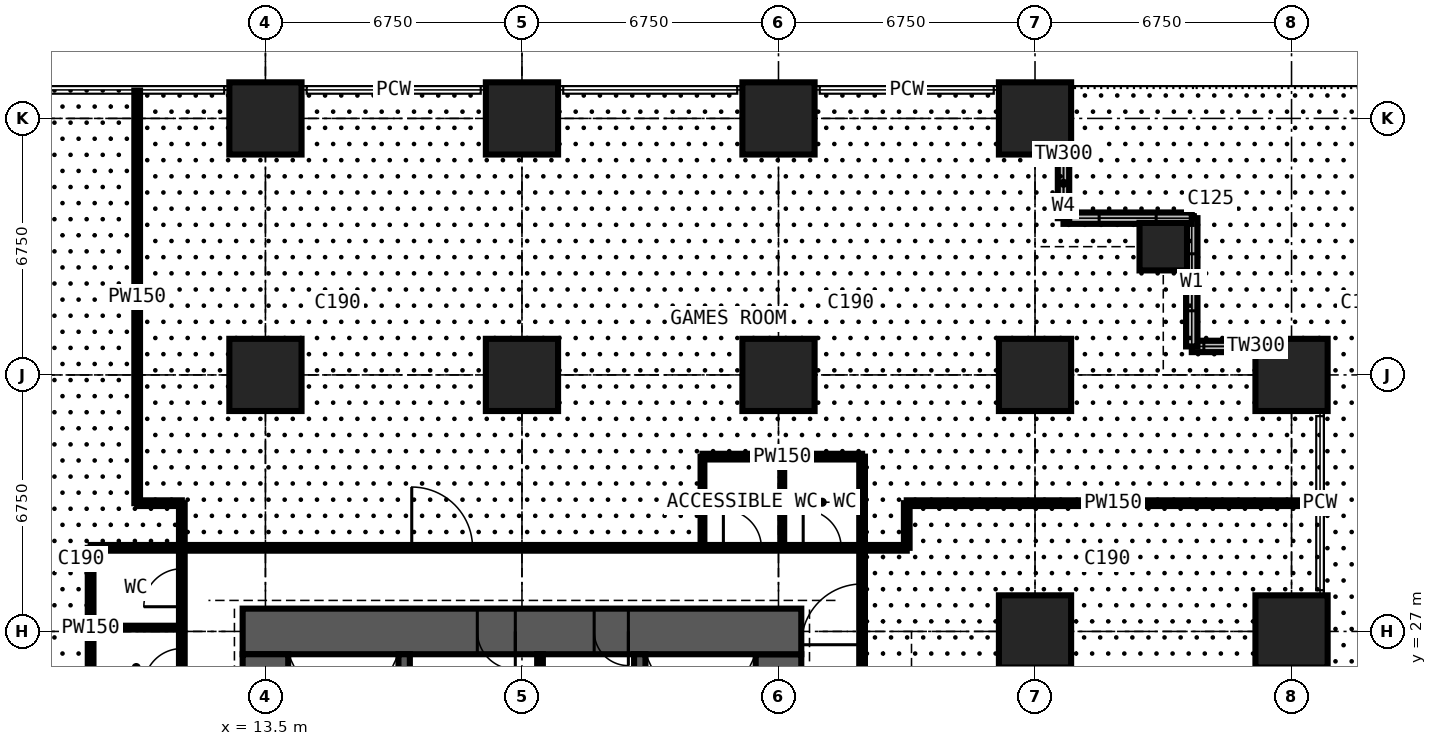
"""IFC4 building model, lengths in metres.
Left out: names, types, materials, properties, quantities, classifications, styles, units other than length and angle.
Written with IfcOpenShell. Run it as: python <this file> out.ifc"""

import sys

from ifc_helpers import new_model, si_unit, direction, frame, frame_2d, origin, origin_2d, place, context, subcontext, project, spatial, rectangle, extrude, element, fill, save


model = new_model("IFC4")
c1 = context("Model", 3, precision=1e-05, world=origin(), true_north=direction((0.0, 1.0)))
c2 = subcontext(c1, "Body", "Model", "MODEL_VIEW")
j1 = project(units=[si_unit("LENGTHUNIT", "METRE"), si_unit("PLANEANGLEUNIT", "RADIAN")], contexts=[c1])
p1 = place(None, origin())
s1 = spatial("IfcSite", under=j1, at=p1, CompositionType="ELEMENT")
p2 = place(p1, origin())
s2 = spatial("IfcBuilding", under=s1, at=p2, CompositionType="ELEMENT")
p3 = place(p2, frame((0.0, 0.0, 13.5)))
s3 = spatial("IfcBuildingStorey", under=s2, at=p3, CompositionType="ELEMENT", Elevation=13.5)
for number, where, z_axis, x_axis in (
    (1, (13.5, 33.75, 0.0), (0.0, 0.0, 1.0), (1.0, 0.0, 0.0)),
    (2, (13.5, 40.5, 0.0), (0.0, 0.0, 1.0), (1.0, 0.0, 0.0)),
    (3, (20.25, 33.75, 0.0), (0.0, 0.0, 1.0), (1.0, 0.0, 0.0)),
    (4, (20.25, 40.5, 0.0), (0.0, 0.0, 1.0), (1.0, 0.0, 0.0)),
    (5, (27.0, 33.75, 0.0), (0.0, 0.0, 1.0), (1.0, 0.0, 0.0)),
    (6, (27.0, 40.5, 0.0), (0.0, 0.0, 1.0), (1.0, 0.0, 0.0)),
    (7, (33.75, 27.0, 0.0), (0.0, 0.0, 1.0), (1.0, 0.0, 0.0)),
    (8, (33.75, 33.75, 0.0), (0.0, 0.0, 1.0), (1.0, 0.0, 0.0)),
    (9, (33.75, 40.5, 0.0), (0.0, 0.0, 1.0), (1.0, 0.0, 0.0)),
):
    element("IfcColumn", number, at=place(p3, frame(where, z_axis=z_axis, x_axis=x_axis)), inside=s3, PredefinedType="COLUMN", context=c2, shape_type="SweptSolid", body=[
        extrude(rectangle(XDim=1.9, YDim=1.9, at=origin_2d()), origin(), (0.0, 0.0, 1.0), 4.5),
    ])
p4 = place(p3, frame((37.125, 37.125, 0.0), z_axis=(0.0, 0.0, 1.0), x_axis=(1.0, 0.0, 0.0)))
e10 = element("IfcColumn", 10, at=p4, inside=s3, PredefinedType="COLUMN", context=c2, shape_type="SweptSolid", body=[
    extrude(rectangle(XDim=1.25, YDim=1.25, at=origin_2d()), origin(), (0.0, 0.0, 1.0), 4.5),
])
for number, where, z_axis, x_axis in (
    (11, (40.5, 27.0, 0.0), (0.0, 0.0, 1.0), (1.0, 0.0, 0.0)),
    (12, (40.5, 33.75, 0.0), (0.0, 0.0, 1.0), (1.0, 0.0, 0.0)),
):
    element("IfcColumn", number, at=place(p3, frame(where, z_axis=z_axis, x_axis=x_axis)), inside=s3, PredefinedType="COLUMN", context=c2, shape_type="SweptSolid", body=[
        extrude(rectangle(XDim=1.9, YDim=1.9, at=origin_2d()), origin(), (0.0, 0.0, 1.0), 4.5),
    ])
p5 = place(p3, frame((27.0, 14.1, 0.0), z_axis=(0.0, 0.0, 1.0), x_axis=(0.0, 1.0, 0.0)))
e13 = element("IfcWall", 13, at=p5, inside=s3, PredefinedType="SHEAR", context=c2, shape_type="SweptSolid", body=[
    extrude(rectangle(XDim=12.3, YDim=1.2, at=frame_2d((6.15, 0.0))), origin(), (0.0, 0.0, 1.0), 4.5),
])
p6 = place(p5, frame((3.65, 0.0, 0.0)))
e14 = element("IfcOpeningElement", 14, at=p6, cuts=e13, PredefinedType="OPENING", context=c2, shape_type="SweptSolid", body=[
    extrude(rectangle(XDim=1.2, YDim=2.2, at=frame_2d((0.6, 1.1))), frame((0.0, 0.61, 0.0), z_axis=(0.0, -1.0, 0.0), x_axis=(1.0, 0.0, 0.0)), (0.0, 0.0, 1.0), 1.22),
])
p7 = place(p3, frame((27.6, 27.0, 0.0), z_axis=(0.0, 0.0, 1.0), x_axis=(-1.0, 0.0, 0.0)))
e15 = element("IfcWall", 15, at=p7, inside=s3, PredefinedType="SHEAR", context=c2, shape_type="SweptSolid", body=[
    extrude(rectangle(XDim=14.7, YDim=1.2, at=frame_2d((7.35, 0.0))), origin(), (0.0, 0.0, 1.0), 4.5),
])
p8 = place(p7, frame((4.55, 0.0, 0.0)))
e16 = element("IfcOpeningElement", 16, at=p8, cuts=e15, PredefinedType="OPENING", context=c2, shape_type="SweptSolid", body=[
    extrude(rectangle(XDim=0.9, YDim=2.2, at=frame_2d((0.45, 1.1))), frame((0.0, 0.61, 0.0), z_axis=(0.0, -1.0, 0.0), x_axis=(1.0, 0.0, 0.0)), (0.0, 0.0, 1.0), 1.22),
])
p9 = place(p7, frame((7.525, 0.0, 0.0)))
e17 = element("IfcOpeningElement", 17, at=p9, cuts=e15, PredefinedType="OPENING", context=c2, shape_type="SweptSolid", body=[
    extrude(rectangle(XDim=1.0, YDim=2.2, at=frame_2d((0.5, 1.1))), frame((0.0, 0.61, 0.0), z_axis=(0.0, -1.0, 0.0), x_axis=(1.0, 0.0, 0.0)), (0.0, 0.0, 1.0), 1.22),
])
p10 = place(p3, frame((13.5, 26.4, 0.0), z_axis=(0.0, 0.0, 1.0), x_axis=(0.0, -1.0, 0.0)))
e18 = element("IfcWall", 18, at=p10, inside=s3, PredefinedType="SHEAR", context=c2, shape_type="SweptSolid", body=[
    extrude(rectangle(XDim=12.3, YDim=1.2, at=frame_2d((6.15, 0.0))), origin(), (0.0, 0.0, 1.0), 4.5),
])
p11 = place(p10, frame((7.45, 0.0, 0.0)))
e19 = element("IfcOpeningElement", 19, at=p11, cuts=e18, PredefinedType="OPENING", context=c2, shape_type="SweptSolid", body=[
    extrude(rectangle(XDim=1.2, YDim=2.2, at=frame_2d((0.6, 1.1))), frame((0.0, 0.61, 0.0), z_axis=(0.0, -1.0, 0.0), x_axis=(1.0, 0.0, 0.0)), (0.0, 0.0, 1.0), 1.22),
])
p12 = place(p3, frame((41.25, 27.0, 0.0), z_axis=(0.0, 0.0, 1.0), x_axis=(0.0, -1.0, 0.0)))
e20 = element("IfcWall", 20, at=p12, inside=s3, PredefinedType="SOLIDWALL", context=c2, shape_type="SweptSolid", body=[
    extrude(rectangle(XDim=6.75, YDim=0.15, at=frame_2d((3.375, 0.0))), origin(), (0.0, 0.0, 1.0), 4.275),
])
p13 = place(p12, frame((0.962, 0.0, 0.0)))
e21 = element("IfcOpeningElement", 21, at=p13, cuts=e20, PredefinedType="OPENING", context=c2, shape_type="SweptSolid", body=[
    extrude(rectangle(XDim=2.4, YDim=2.4, at=frame_2d((1.2, 1.2))), frame((0.0, 0.085, 0.0), z_axis=(0.0, -1.0, 0.0), x_axis=(1.0, 0.0, 0.0)), (0.0, 0.0, 1.0), 0.17),
])
p14 = place(p12, frame((3.387, 0.0, 0.0)))
e22 = element("IfcOpeningElement", 22, at=p14, cuts=e20, PredefinedType="OPENING", context=c2, shape_type="SweptSolid", body=[
    extrude(rectangle(XDim=2.4, YDim=2.4, at=frame_2d((1.2, 1.2))), frame((0.0, 0.085, 0.0), z_axis=(0.0, -1.0, 0.0), x_axis=(1.0, 0.0, 0.0)), (0.0, 0.0, 1.0), 0.17),
])
p15 = place(p3, frame((41.25, 34.5, 0.0), z_axis=(0.0, 0.0, 1.0), x_axis=(-1.0, 0.0, 0.0)))
e23 = element("IfcWall", 23, at=p15, inside=s3, PredefinedType="SOLIDWALL", context=c2, shape_type="SweptSolid", body=[
    extrude(rectangle(XDim=3.375, YDim=0.3, at=frame_2d((1.688, 0.0))), origin(), (0.0, 0.0, 1.0), 4.275),
])
p16 = place(p15, frame((1.857, 0.0, 0.9)))
e24 = element("IfcOpeningElement", 24, at=p16, cuts=e23, PredefinedType="OPENING", context=c2, shape_type="SweptSolid", body=[
    extrude(rectangle(XDim=1.2, YDim=1.8, at=frame_2d((0.6, 0.9))), frame((0.0, 0.16, 0.0), z_axis=(0.0, -1.0, 0.0), x_axis=(1.0, 0.0, 0.0)), (0.0, 0.0, 1.0), 0.32),
])
p17 = place(p3, frame((37.875, 34.5, 0.0), z_axis=(0.0, 0.0, 1.0), x_axis=(0.0, 1.0, 0.0)))
e25 = element("IfcWall", 25, at=p17, inside=s3, PredefinedType="SOLIDWALL", context=c2, shape_type="SweptSolid", body=[
    extrude(rectangle(XDim=3.375, YDim=0.3, at=frame_2d((1.688, 0.0))), origin(), (0.0, 0.0, 1.0), 4.275),
])
p18 = place(p17, frame((0.938, 0.0, 0.9)))
e26 = element("IfcOpeningElement", 26, at=p18, cuts=e25, PredefinedType="OPENING", context=c2, shape_type="SweptSolid", body=[
    extrude(rectangle(XDim=1.5, YDim=1.8, at=frame_2d((0.75, 0.9))), frame((0.0, 0.16, 0.0), z_axis=(0.0, -1.0, 0.0), x_axis=(1.0, 0.0, 0.0)), (0.0, 0.0, 1.0), 0.32),
])
p19 = place(p3, frame((37.875, 37.875, 0.0), z_axis=(0.0, 0.0, 1.0), x_axis=(-1.0, 0.0, 0.0)))
e27 = element("IfcWall", 27, at=p19, inside=s3, PredefinedType="SOLIDWALL", context=c2, shape_type="SweptSolid", body=[
    extrude(rectangle(XDim=3.375, YDim=0.3, at=frame_2d((1.688, 0.0))), origin(), (0.0, 0.0, 1.0), 4.275),
])
p20 = place(p19, frame((0.938, 0.0, 0.9)))
e28 = element("IfcOpeningElement", 28, at=p20, cuts=e27, PredefinedType="OPENING", context=c2, shape_type="SweptSolid", body=[
    extrude(rectangle(XDim=1.5, YDim=1.8, at=frame_2d((0.75, 0.9))), frame((0.0, 0.16, 0.0), z_axis=(0.0, -1.0, 0.0), x_axis=(1.0, 0.0, 0.0)), (0.0, 0.0, 1.0), 0.32),
])
p21 = place(p3, frame((34.5, 37.875, 0.0), z_axis=(0.0, 0.0, 1.0), x_axis=(0.0, 1.0, 0.0)))
e29 = element("IfcWall", 29, at=p21, inside=s3, PredefinedType="SOLIDWALL", context=c2, shape_type="SweptSolid", body=[
    extrude(rectangle(XDim=3.375, YDim=0.3, at=frame_2d((1.688, 0.0))), origin(), (0.0, 0.0, 1.0), 4.275),
])
p22 = place(p21, frame((0.317, 0.0, 0.9)))
e30 = element("IfcOpeningElement", 30, at=p22, cuts=e29, PredefinedType="OPENING", context=c2, shape_type="SweptSolid", body=[
    extrude(rectangle(XDim=1.2, YDim=1.8, at=frame_2d((0.6, 0.9))), frame((0.0, 0.16, 0.0), z_axis=(0.0, -1.0, 0.0), x_axis=(1.0, 0.0, 0.0)), (0.0, 0.0, 1.0), 0.32),
])
for number, where, z_axis, x_axis in (
    (31, (17.15, 20.3, 0.0), (0.0, 0.0, 1.0), (0.0, 1.0, 0.0)),
    (32, (23.35, 20.3, 0.0), (0.0, 0.0, 1.0), (0.0, 1.0, 0.0)),
):
    element("IfcWall", number, at=place(p3, frame(where, z_axis=z_axis, x_axis=x_axis)), inside=s3, PredefinedType="SHEAR", context=c2, shape_type="SweptSolid", body=[
        extrude(rectangle(XDim=6.1, YDim=0.3, at=frame_2d((3.05, 0.0))), origin(), (0.0, 0.0, 1.0), 4.5),
    ])
p23 = place(p3, frame((20.725, 23.4, 0.0), z_axis=(0.0, 0.0, 1.0), x_axis=(0.0, 1.0, 0.0)))
e33 = element("IfcWall", 33, at=p23, inside=s3, PredefinedType="PARTITIONING", context=c2, shape_type="SweptSolid", body=[
    extrude(rectangle(XDim=3.0, YDim=0.15, at=frame_2d((1.5, 0.0))), origin(), (0.0, 0.0, 1.0), 4.275),
])
p24 = place(p3, frame((8.9, 25.0, 0.0), z_axis=(0.0, 0.0, 1.0), x_axis=(0.0, 1.0, 0.0)))
e34 = element("IfcWall", 34, at=p24, inside=s3, PredefinedType="PARTITIONING", context=c2, shape_type="SweptSolid", body=[
    extrude(rectangle(XDim=4.2, YDim=0.15, at=frame_2d((2.1, 0.0))), origin(), (0.0, 0.0, 1.0), 4.275),
])
p25 = place(p3, frame((8.9, 27.1, 0.0), z_axis=(0.0, 0.0, 1.0), x_axis=(1.0, 0.0, 0.0)))
e35 = element("IfcWall", 35, at=p25, inside=s3, PredefinedType="PARTITIONING", context=c2, shape_type="SweptSolid", body=[
    extrude(rectangle(XDim=2.4, YDim=0.1, at=frame_2d((1.2, 0.0))), origin(), (0.0, 0.0, 1.0), 3.777),
])
p26 = place(p3, frame((8.9, 29.2, 0.0), z_axis=(0.0, 0.0, 1.0), x_axis=(1.0, 0.0, 0.0)))
e36 = element("IfcWall", 36, at=p26, inside=s3, PredefinedType="PARTITIONING", context=c2, shape_type="SweptSolid", body=[
    extrude(rectangle(XDim=21.475, YDim=0.15, at=frame_2d((10.738, 0.0))), origin(), (0.0, 0.0, 1.0), 4.275),
])
p27 = place(p26, frame((16.65, 0.0, 0.0)))
e37 = element("IfcOpeningElement", 37, at=p27, cuts=e36, PredefinedType="OPENING", context=c2, shape_type="SweptSolid", body=[
    extrude(rectangle(XDim=1.0, YDim=2.2, at=frame_2d((0.5, 1.1))), frame((0.0, 0.085, 0.0), z_axis=(0.0, -1.0, 0.0), x_axis=(1.0, 0.0, 0.0)), (0.0, 0.0, 1.0), 0.17),
])
p28 = place(p26, frame((18.75, 0.0, 0.0)))
e38 = element("IfcOpeningElement", 38, at=p28, cuts=e36, PredefinedType="OPENING", context=c2, shape_type="SweptSolid", body=[
    extrude(rectangle(XDim=1.0, YDim=2.2, at=frame_2d((0.5, 1.1))), frame((0.0, 0.085, 0.0), z_axis=(0.0, -1.0, 0.0), x_axis=(1.0, 0.0, 0.0)), (0.0, 0.0, 1.0), 0.17),
])
p29 = place(p26, frame((8.45, 0.0, 0.0)))
e39 = element("IfcOpeningElement", 39, at=p29, cuts=e36, PredefinedType="OPENING", context=c2, shape_type="SweptSolid", body=[
    extrude(rectangle(XDim=1.6, YDim=2.4, at=frame_2d((0.8, 1.2))), frame((0.0, 0.085, 0.0), z_axis=(0.0, -1.0, 0.0), x_axis=(1.0, 0.0, 0.0)), (0.0, 0.0, 1.0), 0.17),
])
p30 = place(p3, frame((10.125, 30.375, 0.0), z_axis=(0.0, 0.0, 1.0), x_axis=(0.0, 1.0, 0.0)))
e40 = element("IfcWall", 40, at=p30, inside=s3, PredefinedType="PARTITIONING", context=c2, shape_type="SweptSolid", body=[
    extrude(rectangle(XDim=10.859, YDim=0.15, at=frame_2d((5.429, 0.0))), origin(), (0.0, 0.0, 1.0), 4.275),
])
p31 = place(p3, frame((10.125, 30.375, 0.0), z_axis=(0.0, 0.0, 1.0), x_axis=(1.0, 0.0, 0.0)))
e41 = element("IfcWall", 41, at=p31, inside=s3, PredefinedType="PARTITIONING", context=c2, shape_type="SweptSolid", body=[
    extrude(rectangle(XDim=1.175, YDim=0.15, at=frame_2d((0.587, 0.0))), origin(), (0.0, 0.0, 1.0), 4.275),
])
p32 = place(p3, frame((11.3, 8.9, 0.0), z_axis=(0.0, 0.0, 1.0), x_axis=(0.0, 1.0, 0.0)))
e42 = element("IfcWall", 42, at=p32, inside=s3, PredefinedType="PARTITIONING", context=c2, shape_type="SweptSolid", body=[
    extrude(rectangle(XDim=21.475, YDim=0.15, at=frame_2d((10.738, 0.0))), origin(), (0.0, 0.0, 1.0), 4.275),
])
p33 = place(p32, frame((16.65, 0.0, 0.0)))
e43 = element("IfcOpeningElement", 43, at=p33, cuts=e42, PredefinedType="OPENING", context=c2, shape_type="SweptSolid", body=[
    extrude(rectangle(XDim=1.0, YDim=2.2, at=frame_2d((0.5, 1.1))), frame((0.0, 0.085, 0.0), z_axis=(0.0, -1.0, 0.0), x_axis=(1.0, 0.0, 0.0)), (0.0, 0.0, 1.0), 0.17),
])
p34 = place(p32, frame((18.75, 0.0, 0.0)))
e44 = element("IfcOpeningElement", 44, at=p34, cuts=e42, PredefinedType="OPENING", context=c2, shape_type="SweptSolid", body=[
    extrude(rectangle(XDim=1.0, YDim=2.2, at=frame_2d((0.5, 1.1))), frame((0.0, 0.085, 0.0), z_axis=(0.0, -1.0, 0.0), x_axis=(1.0, 0.0, 0.0)), (0.0, 0.0, 1.0), 0.17),
])
p35 = place(p32, frame((8.45, 0.0, 0.0)))
e45 = element("IfcOpeningElement", 45, at=p35, cuts=e42, PredefinedType="OPENING", context=c2, shape_type="SweptSolid", body=[
    extrude(rectangle(XDim=1.6, YDim=2.4, at=frame_2d((0.8, 1.2))), frame((0.0, 0.085, 0.0), z_axis=(0.0, -1.0, 0.0), x_axis=(1.0, 0.0, 0.0)), (0.0, 0.0, 1.0), 0.17),
])
p36 = place(p3, frame((25.0, 29.2, 0.0), z_axis=(0.0, 0.0, 1.0), x_axis=(0.0, 1.0, 0.0)))
e46 = element("IfcWall", 46, at=p36, inside=s3, PredefinedType="PARTITIONING", context=c2, shape_type="SweptSolid", body=[
    extrude(rectangle(XDim=2.4, YDim=0.1, at=frame_2d((1.2, 0.0))), origin(), (0.0, 0.0, 1.0), 4.275),
])
p37 = place(p3, frame((25.0, 31.6, 0.0), z_axis=(0.0, 0.0, 1.0), x_axis=(1.0, 0.0, 0.0)))
e47 = element("IfcWall", 47, at=p37, inside=s3, PredefinedType="PARTITIONING", context=c2, shape_type="SweptSolid", body=[
    extrude(rectangle(XDim=4.2, YDim=0.15, at=frame_2d((2.1, 0.0))), origin(), (0.0, 0.0, 1.0), 4.275),
])
p38 = place(p3, frame((27.1, 29.2, 0.0), z_axis=(0.0, 0.0, 1.0), x_axis=(0.0, 1.0, 0.0)))
e48 = element("IfcWall", 48, at=p38, inside=s3, PredefinedType="PARTITIONING", context=c2, shape_type="SweptSolid", body=[
    extrude(rectangle(XDim=2.4, YDim=0.1, at=frame_2d((1.2, 0.0))), origin(), (0.0, 0.0, 1.0), 3.777),
])
p39 = place(p3, frame((29.2, 11.3, 0.0), z_axis=(0.0, 0.0, 1.0), x_axis=(0.0, 1.0, 0.0)))
e49 = element("IfcWall", 49, at=p39, inside=s3, PredefinedType="PARTITIONING", context=c2, shape_type="SweptSolid", body=[
    extrude(rectangle(XDim=20.3, YDim=0.15, at=frame_2d((10.15, 0.0))), origin(), (0.0, 0.0, 1.0), 4.275),
])
p40 = place(p39, frame((15.35, 0.0, 0.0)))
e50 = element("IfcOpeningElement", 50, at=p40, cuts=e49, PredefinedType="OPENING", context=c2, shape_type="SweptSolid", body=[
    extrude(rectangle(XDim=1.6, YDim=2.4, at=frame_2d((0.8, 1.2))), frame((0.0, 0.085, 0.0), z_axis=(0.0, -1.0, 0.0), x_axis=(1.0, 0.0, 0.0)), (0.0, 0.0, 1.0), 0.17),
])
p41 = place(p39, frame((8.35, 0.0, 0.0)))
e51 = element("IfcOpeningElement", 51, at=p41, cuts=e49, PredefinedType="OPENING", context=c2, shape_type="SweptSolid", body=[
    extrude(rectangle(XDim=1.2, YDim=2.2, at=frame_2d((0.6, 1.1))), frame((0.0, 0.085, 0.0), z_axis=(0.0, -1.0, 0.0), x_axis=(1.0, 0.0, 0.0)), (0.0, 0.0, 1.0), 0.17),
])
p42 = place(p3, frame((30.375, 29.2, 0.0), z_axis=(0.0, 0.0, 1.0), x_axis=(0.0, 1.0, 0.0)))
e52 = element("IfcWall", 52, at=p42, inside=s3, PredefinedType="PARTITIONING", context=c2, shape_type="SweptSolid", body=[
    extrude(rectangle(XDim=1.175, YDim=0.15, at=frame_2d((0.587, 0.0))), origin(), (0.0, 0.0, 1.0), 4.275),
])
p43 = place(p3, frame((30.375, 30.375, 0.0), z_axis=(0.0, 0.0, 1.0), x_axis=(1.0, 0.0, 0.0)))
e53 = element("IfcWall", 53, at=p43, inside=s3, PredefinedType="PARTITIONING", context=c2, shape_type="SweptSolid", body=[
    extrude(rectangle(XDim=10.859, YDim=0.15, at=frame_2d((5.429, 0.0))), origin(), (0.0, 0.0, 1.0), 4.275),
])
p44 = place(p16, origin())
e54 = element("IfcWindow", 54, at=p44, inside=s3, PartitioningType="SINGLE_PANEL", PredefinedType="WINDOW", context=c2, shape_type="SweptSolid", body=[
    extrude(rectangle(XDim=1.2, YDim=1.8, at=frame_2d((0.6, 0.9))), frame((0.0, 0.03, 0.0), z_axis=(0.0, -1.0, 0.0), x_axis=(1.0, 0.0, 0.0)), (0.0, 0.0, 1.0), 0.06),
])
fill(e24, e54)
p45 = place(p18, origin())
e55 = element("IfcWindow", 55, at=p45, inside=s3, PartitioningType="SINGLE_PANEL", PredefinedType="WINDOW", context=c2, shape_type="SweptSolid", body=[
    extrude(rectangle(XDim=1.5, YDim=1.8, at=frame_2d((0.75, 0.9))), frame((0.0, 0.03, 0.0), z_axis=(0.0, -1.0, 0.0), x_axis=(1.0, 0.0, 0.0)), (0.0, 0.0, 1.0), 0.06),
])
fill(e26, e55)
p46 = place(p20, origin())
e56 = element("IfcWindow", 56, at=p46, inside=s3, PartitioningType="SINGLE_PANEL", PredefinedType="WINDOW", context=c2, shape_type="SweptSolid", body=[
    extrude(rectangle(XDim=1.5, YDim=1.8, at=frame_2d((0.75, 0.9))), frame((0.0, 0.03, 0.0), z_axis=(0.0, -1.0, 0.0), x_axis=(1.0, 0.0, 0.0)), (0.0, 0.0, 1.0), 0.06),
])
fill(e28, e56)
p47 = place(p22, origin())
e57 = element("IfcWindow", 57, at=p47, inside=s3, PartitioningType="SINGLE_PANEL", PredefinedType="WINDOW", context=c2, shape_type="SweptSolid", body=[
    extrude(rectangle(XDim=1.2, YDim=1.8, at=frame_2d((0.6, 0.9))), frame((0.0, 0.03, 0.0), z_axis=(0.0, -1.0, 0.0), x_axis=(1.0, 0.0, 0.0)), (0.0, 0.0, 1.0), 0.06),
])
fill(e30, e57)
p48 = place(p8, origin())
e58 = element("IfcDoor", 58, at=p48, inside=s3, OperationType="SINGLE_SWING_LEFT", PredefinedType="DOOR", context=c2, shape_type="SweptSolid", body=[
    extrude(rectangle(XDim=0.9, YDim=2.2, at=frame_2d((0.45, 1.1))), frame((0.0, 0.4, 0.0), z_axis=(0.0, -1.0, 0.0), x_axis=(1.0, 0.0, 0.0)), (0.0, 0.0, 1.0), 0.8),
])
fill(e16, e58)
p49 = place(p9, origin())
e59 = element("IfcDoor", 59, at=p49, inside=s3, OperationType="SINGLE_SWING_LEFT", PredefinedType="DOOR", context=c2, shape_type="SweptSolid", body=[
    extrude(rectangle(XDim=1.0, YDim=2.2, at=frame_2d((0.5, 1.1))), frame((0.0, 0.025, 0.0), z_axis=(0.0, -1.0, 0.0), x_axis=(1.0, 0.0, 0.0)), (0.0, 0.0, 1.0), 0.05),
])
fill(e17, e59)
p50 = place(p40, origin())
e60 = element("IfcDoor", 60, at=p50, inside=s3, OperationType="DOUBLE_DOOR_SINGLE_SWING", PredefinedType="DOOR", context=c2, shape_type="SweptSolid", body=[
    extrude(rectangle(XDim=1.6, YDim=2.4, at=frame_2d((0.8, 1.2))), frame((0.0, 0.025, 0.0), z_axis=(0.0, -1.0, 0.0), x_axis=(1.0, 0.0, 0.0)), (0.0, 0.0, 1.0), 0.05),
])
fill(e50, e60)
p51 = place(p27, origin())
e61 = element("IfcDoor", 61, at=p51, inside=s3, OperationType="SINGLE_SWING_LEFT", PredefinedType="DOOR", context=c2, shape_type="SweptSolid", body=[
    extrude(rectangle(XDim=1.0, YDim=2.2, at=frame_2d((0.5, 1.1))), frame((0.0, 0.025, 0.0), z_axis=(0.0, -1.0, 0.0), x_axis=(1.0, 0.0, 0.0)), (0.0, 0.0, 1.0), 0.05),
])
fill(e37, e61)
p52 = place(p28, origin())
e62 = element("IfcDoor", 62, at=p52, inside=s3, OperationType="SINGLE_SWING_LEFT", PredefinedType="DOOR", context=c2, shape_type="SweptSolid", body=[
    extrude(rectangle(XDim=1.0, YDim=2.2, at=frame_2d((0.5, 1.1))), frame((0.0, 0.025, 0.0), z_axis=(0.0, -1.0, 0.0), x_axis=(1.0, 0.0, 0.0)), (0.0, 0.0, 1.0), 0.05),
])
fill(e38, e62)
p53 = place(p29, origin())
e63 = element("IfcDoor", 63, at=p53, inside=s3, OperationType="DOUBLE_DOOR_SINGLE_SWING", PredefinedType="DOOR", context=c2, shape_type="SweptSolid", body=[
    extrude(rectangle(XDim=1.6, YDim=2.4, at=frame_2d((0.8, 1.2))), frame((0.0, 0.025, 0.0), z_axis=(0.0, -1.0, 0.0), x_axis=(1.0, 0.0, 0.0)), (0.0, 0.0, 1.0), 0.05),
])
fill(e39, e63)
p54 = place(p33, origin())
e64 = element("IfcDoor", 64, at=p54, inside=s3, OperationType="SINGLE_SWING_LEFT", PredefinedType="DOOR", context=c2, shape_type="SweptSolid", body=[
    extrude(rectangle(XDim=1.0, YDim=2.2, at=frame_2d((0.5, 1.1))), frame((0.0, 0.025, 0.0), z_axis=(0.0, -1.0, 0.0), x_axis=(1.0, 0.0, 0.0)), (0.0, 0.0, 1.0), 0.05),
])
fill(e43, e64)
p55 = place(p34, origin())
e65 = element("IfcDoor", 65, at=p55, inside=s3, OperationType="SINGLE_SWING_LEFT", PredefinedType="DOOR", context=c2, shape_type="SweptSolid", body=[
    extrude(rectangle(XDim=1.0, YDim=2.2, at=frame_2d((0.5, 1.1))), frame((0.0, 0.025, 0.0), z_axis=(0.0, -1.0, 0.0), x_axis=(1.0, 0.0, 0.0)), (0.0, 0.0, 1.0), 0.05),
])
fill(e44, e65)
save(model, sys.argv[1])
